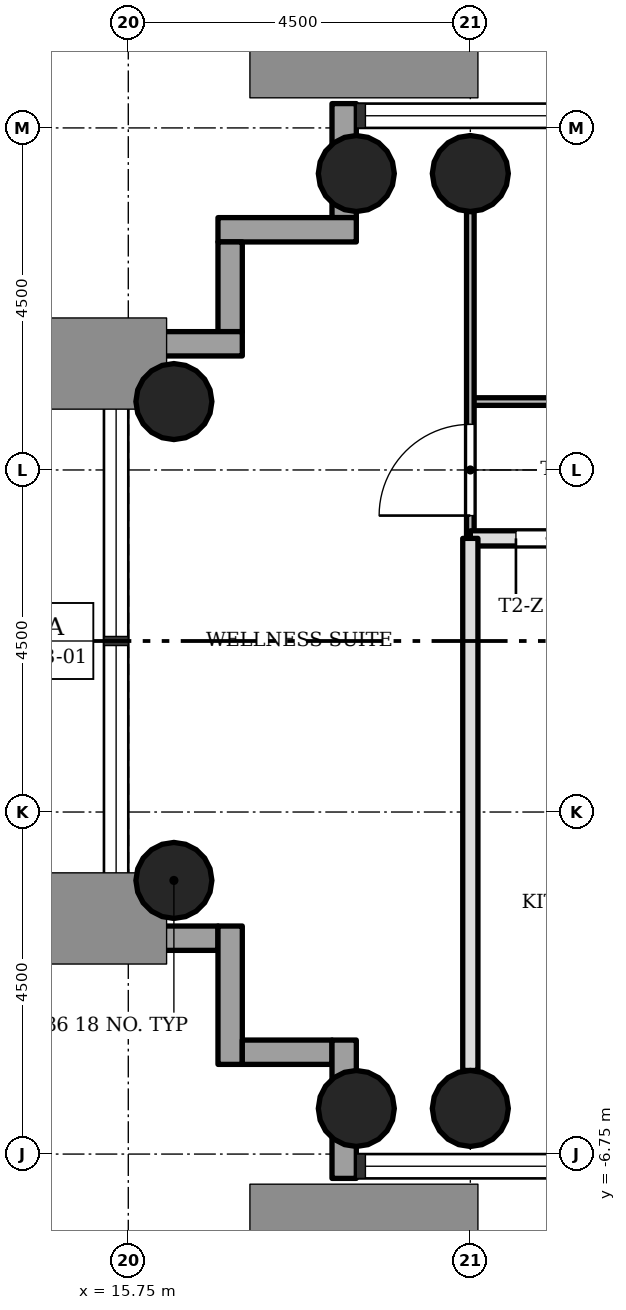
"""IFC4 building model, lengths in metres.
Left out: names, types, materials, properties, quantities, classifications, styles, units other than length and angle.
Written with IfcOpenShell. Run it as: python <this file> out.ifc"""

import sys

from ifc_helpers import new_model, si_unit, direction, frame, frame_2d, origin, origin_2d, place, context, subcontext, project, spatial, rectangle, hollow_circle, extrude, element, fill, save


model = new_model("IFC4")
c1 = context("Model", 3, precision=1e-05, world=origin(), true_north=direction((0.0, 1.0)))
c2 = subcontext(c1, "Body", "Model", "MODEL_VIEW")
j1 = project(units=[si_unit("LENGTHUNIT", "METRE"), si_unit("PLANEANGLEUNIT", "RADIAN")], contexts=[c1])
p1 = place(None, origin())
s1 = spatial("IfcSite", under=j1, at=p1, CompositionType="ELEMENT")
p2 = place(p1, origin())
s2 = spatial("IfcBuilding", under=s1, at=p2, CompositionType="ELEMENT")
p3 = place(p2, frame((0.0, 0.0, 51.7)))
s3 = spatial("IfcBuildingStorey", under=s2, at=p3, CompositionType="ELEMENT", Elevation=51.7)
for number, where, z_axis, x_axis in (
    (1, (20.25, 6.15, 0.0), (0.0, 0.0, 1.0), (1.0, 0.0, 0.0)),
    (2, (20.25, -6.15, 0.0), (0.0, 0.0, 1.0), (1.0, 0.0, 0.0)),
    (3, (18.75, 6.15, 0.0), (0.0, 0.0, 1.0), (1.0, 0.0, 0.0)),
    (4, (18.75, -6.15, 0.0), (0.0, 0.0, 1.0), (1.0, 0.0, 0.0)),
    (5, (16.35, 3.15, 0.0), (0.0, 0.0, 1.0), (1.0, 0.0, 0.0)),
    (6, (16.35, -3.15, 0.0), (0.0, 0.0, 1.0), (1.0, 0.0, 0.0)),
):
    element("IfcColumn", number, at=place(p3, frame(where, z_axis=z_axis, x_axis=x_axis)), inside=s3, PredefinedType="COLUMN", context=c2, shape_type="SweptSolid", body=[
        extrude(hollow_circle(Radius=0.5, WallThickness=0.036, at=origin_2d()), origin(), (0.0, 0.0, 1.0), 3.4),
    ])
p4 = place(p3, frame((18.59, 7.07, -0.3), z_axis=(0.0, 0.0, 1.0), x_axis=(0.0, -1.0, 0.0)))
e7 = element("IfcWall", 7, at=p4, inside=s3, PredefinedType="STANDARD", context=c2, shape_type="SweptSolid", body=[
    extrude(rectangle(XDim=1.5, YDim=0.32, at=frame_2d((0.75, 0.0))), origin(), (0.0, 0.0, 1.0), 3.4),
])
p5 = place(p3, frame((18.75, 5.41, -0.3), z_axis=(0.0, 0.0, 1.0), x_axis=(-1.0, 0.0, 0.0)))
e8 = element("IfcWall", 8, at=p5, inside=s3, PredefinedType="STANDARD", context=c2, shape_type="SweptSolid", body=[
    extrude(rectangle(XDim=1.82, YDim=0.32, at=frame_2d((0.91, 0.0))), origin(), (0.0, 0.0, 1.0), 3.4),
])
p6 = place(p3, frame((17.09, 5.25, -0.3), z_axis=(0.0, 0.0, 1.0), x_axis=(0.0, -1.0, 0.0)))
e9 = element("IfcWall", 9, at=p6, inside=s3, PredefinedType="STANDARD", context=c2, shape_type="SweptSolid", body=[
    extrude(rectangle(XDim=1.18, YDim=0.32, at=frame_2d((0.59, 0.0))), origin(), (0.0, 0.0, 1.0), 3.4),
])
p7 = place(p3, frame((17.25, 3.91, -0.3), z_axis=(0.0, 0.0, 1.0), x_axis=(-1.0, 0.0, 0.0)))
e10 = element("IfcWall", 10, at=p7, inside=s3, PredefinedType="STANDARD", context=c2, shape_type="SweptSolid", body=[
    extrude(rectangle(XDim=1.82, YDim=0.32, at=frame_2d((0.91, 0.0))), origin(), (0.0, 0.0, 1.0), 3.4),
])
p8 = place(p3, frame((15.43, -3.91, -0.3), z_axis=(0.0, 0.0, 1.0), x_axis=(1.0, 0.0, 0.0)))
e11 = element("IfcWall", 11, at=p8, inside=s3, PredefinedType="STANDARD", context=c2, shape_type="SweptSolid", body=[
    extrude(rectangle(XDim=1.5, YDim=0.32, at=frame_2d((0.75, 0.0))), origin(), (0.0, 0.0, 1.0), 3.4),
])
p9 = place(p3, frame((17.09, -3.75, -0.3), z_axis=(0.0, 0.0, 1.0), x_axis=(0.0, -1.0, 0.0)))
e12 = element("IfcWall", 12, at=p9, inside=s3, PredefinedType="STANDARD", context=c2, shape_type="SweptSolid", body=[
    extrude(rectangle(XDim=1.82, YDim=0.32, at=frame_2d((0.91, 0.0))), origin(), (0.0, 0.0, 1.0), 3.4),
])
p10 = place(p3, frame((17.25, -5.41, -0.3), z_axis=(0.0, 0.0, 1.0), x_axis=(1.0, 0.0, 0.0)))
e13 = element("IfcWall", 13, at=p10, inside=s3, PredefinedType="STANDARD", context=c2, shape_type="SweptSolid", body=[
    extrude(rectangle(XDim=1.18, YDim=0.32, at=frame_2d((0.59, 0.0))), origin(), (0.0, 0.0, 1.0), 3.4),
])
p11 = place(p3, frame((18.59, -5.25, -0.3), z_axis=(0.0, 0.0, 1.0), x_axis=(0.0, -1.0, 0.0)))
e14 = element("IfcWall", 14, at=p11, inside=s3, PredefinedType="STANDARD", context=c2, shape_type="SweptSolid", body=[
    extrude(rectangle(XDim=1.82, YDim=0.32, at=frame_2d((0.91, 0.0))), origin(), (0.0, 0.0, 1.0), 3.4),
])
p12 = place(p3, frame((24.75, 1.35, 0.0), z_axis=(0.0, 0.0, 1.0), x_axis=(-1.0, 0.0, 0.0)))
e15 = element("IfcWall", 15, at=p12, inside=s3, PredefinedType="SOLIDWALL", context=c2, shape_type="SweptSolid", body=[
    extrude(rectangle(XDim=4.5, YDim=0.2, at=frame_2d((2.25, 0.0))), origin(), (0.0, 0.0, 1.0), 3.0),
])
p13 = place(p12, frame((3.0, 0.0, 0.0)))
e16 = element("IfcOpeningElement", 16, at=p13, cuts=e15, PredefinedType="OPENING", context=c2, shape_type="SweptSolid", body=[
    extrude(rectangle(XDim=0.9, YDim=2.1, at=frame_2d((0.45, 1.05))), frame((0.0, 0.11, 0.0), z_axis=(0.0, -1.0, 0.0), x_axis=(1.0, 0.0, 0.0)), (0.0, 0.0, 1.0), 0.22),
])
p14 = place(p3, frame((29.25, 3.15, 0.0), z_axis=(0.0, 0.0, 1.0), x_axis=(-1.0, 0.0, 0.0)))
e17 = element("IfcWall", 17, at=p14, inside=s3, PredefinedType="PARTITIONING", context=c2, shape_type="SweptSolid", body=[
    extrude(rectangle(XDim=9.0, YDim=0.1, at=frame_2d((4.5, 0.0))), origin(), (0.0, 0.0, 1.0), 3.0),
])
p15 = place(p14, frame((1.8, 0.0, 0.0)))
e18 = element("IfcOpeningElement", 18, at=p15, cuts=e17, PredefinedType="OPENING", context=c2, shape_type="SweptSolid", body=[
    extrude(rectangle(XDim=0.9, YDim=2.1, at=frame_2d((0.45, 1.05))), frame((0.0, 0.06, 0.0), z_axis=(0.0, -1.0, 0.0), x_axis=(1.0, 0.0, 0.0)), (0.0, 0.0, 1.0), 0.12),
])
p16 = place(p14, frame((6.3, 0.0, 0.0)))
e19 = element("IfcOpeningElement", 19, at=p16, cuts=e17, PredefinedType="OPENING", context=c2, shape_type="SweptSolid", body=[
    extrude(rectangle(XDim=0.9, YDim=2.1, at=frame_2d((0.45, 1.05))), frame((0.0, 0.06, 0.0), z_axis=(0.0, -1.0, 0.0), x_axis=(1.0, 0.0, 0.0)), (0.0, 0.0, 1.0), 0.12),
])
p17 = place(p3, frame((20.25, 1.35, 0.0), z_axis=(0.0, 0.0, 1.0), x_axis=(0.0, 1.0, 0.0)))
e20 = element("IfcWall", 20, at=p17, inside=s3, PredefinedType="PARTITIONING", context=c2, shape_type="SweptSolid", body=[
    extrude(rectangle(XDim=4.3, YDim=0.1, at=frame_2d((2.15, 0.0))), origin(), (0.0, 0.0, 1.0), 3.0),
])
p18 = place(p17, frame((0.3, 0.0, 0.0)))
e21 = element("IfcOpeningElement", 21, at=p18, cuts=e20, PredefinedType="OPENING", context=c2, shape_type="SweptSolid", body=[
    extrude(rectangle(XDim=1.2, YDim=2.1, at=frame_2d((0.6, 1.05))), frame((0.0, 0.06, 0.0), z_axis=(0.0, -1.0, 0.0), x_axis=(1.0, 0.0, 0.0)), (0.0, 0.0, 1.0), 0.12),
])
p19 = place(p3, frame((20.25, -5.65, 0.0), z_axis=(0.0, 0.0, 1.0), x_axis=(0.0, 1.0, 0.0)))
e22 = element("IfcWall", 22, at=p19, inside=s3, PredefinedType="SOLIDWALL", context=c2, shape_type="SweptSolid", body=[
    extrude(rectangle(XDim=7.0, YDim=0.2, at=frame_2d((3.5, 0.0))), origin(), (0.0, 0.0, 1.0), 3.0),
])
p20 = place(p13, origin())
e23 = element("IfcDoor", 23, at=p20, inside=s3, OperationType="SINGLE_SWING_LEFT", PredefinedType="DOOR", context=c2, shape_type="SweptSolid", body=[
    extrude(rectangle(XDim=0.9, YDim=2.1, at=frame_2d((0.45, 1.05))), frame((0.0, 0.025, 0.0), z_axis=(0.0, -1.0, 0.0), x_axis=(1.0, 0.0, 0.0)), (0.0, 0.0, 1.0), 0.05),
])
fill(e16, e23)
p21 = place(p18, origin())
e24 = element("IfcDoor", 24, at=p21, inside=s3, OperationType="SINGLE_SWING_RIGHT", PredefinedType="DOOR", context=c2, shape_type="SweptSolid", body=[
    extrude(rectangle(XDim=1.2, YDim=2.1, at=frame_2d((0.6, 1.05))), frame((0.0, 0.025, 0.0), z_axis=(0.0, -1.0, 0.0), x_axis=(1.0, 0.0, 0.0)), (0.0, 0.0, 1.0), 0.05),
])
fill(e21, e24)
save(model, sys.argv[1])
